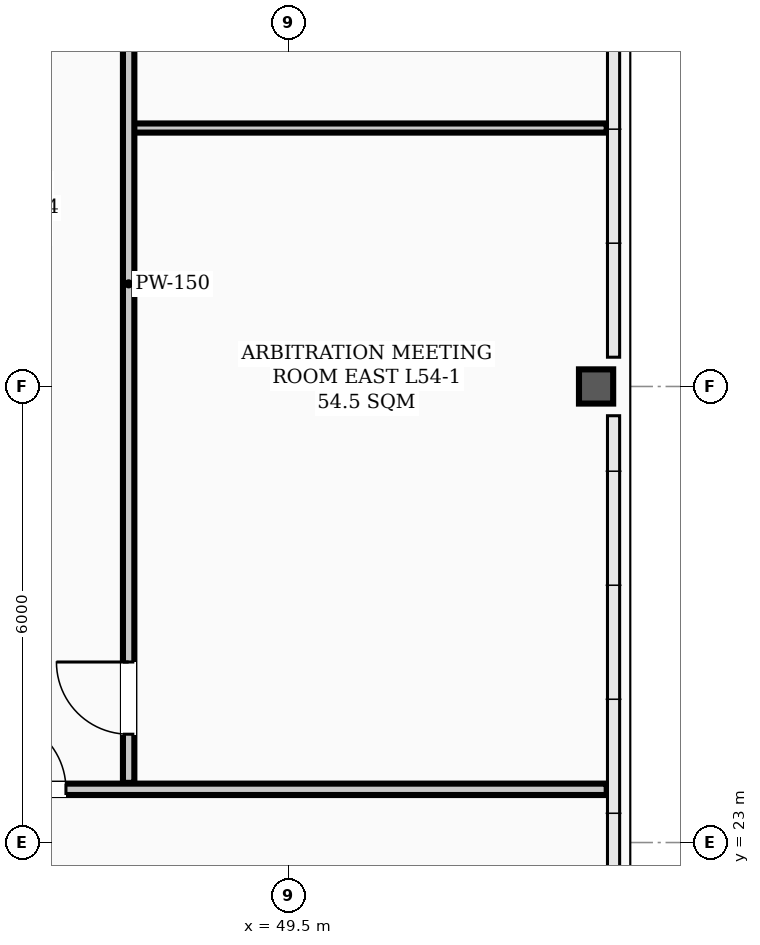
"""IFC4 building model, lengths in metres.
Left out: names, types, materials, properties, quantities, classifications, styles, units other than length and angle.
Written with IfcOpenShell. Run it as: python <this file> out.ifc"""

import sys

from ifc_helpers import new_model, si_unit, direction, frame, frame_2d, origin, origin_2d, place, context, subcontext, project, spatial, rectangle, hollow_rectangle, extrude, element, fill, save


model = new_model("IFC4")
c1 = context("Model", 3, precision=1e-05, world=origin(), true_north=direction((0.0, 1.0)))
c2 = subcontext(c1, "Body", "Model", "MODEL_VIEW")
j1 = project(units=[si_unit("LENGTHUNIT", "METRE"), si_unit("PLANEANGLEUNIT", "RADIAN")], contexts=[c1])
p1 = place(None, origin())
s1 = spatial("IfcSite", under=j1, at=p1, CompositionType="ELEMENT")
p2 = place(p1, origin())
s2 = spatial("IfcBuilding", under=s1, at=p2, CompositionType="ELEMENT")
p3 = place(p2, frame((0.0, 0.0, 218.9)))
s3 = spatial("IfcBuildingStorey", under=s2, at=p3, CompositionType="ELEMENT", Elevation=218.9)
p4 = place(p3, frame((53.55, 29.0, 0.0), z_axis=(0.0, 0.0, 1.0), x_axis=(1.0, 0.0, 0.0)))
e1 = element("IfcColumn", 1, at=p4, inside=s3, PredefinedType="COLUMN", context=c2, shape_type="SweptSolid", body=[
    extrude(hollow_rectangle(XDim=0.45, YDim=0.45, WallThickness=0.022, InnerFilletRadius=0.022, OuterFilletRadius=0.044, at=origin_2d()), origin(), (0.0, 0.0, 1.0), 3.9),
])
p5 = place(p3, frame((10.31, 23.7, 0.0), z_axis=(0.0, 0.0, 1.0), x_axis=(1.0, 0.0, 0.0)))
e2 = element("IfcWall", 2, at=p5, inside=s3, PredefinedType="PARTITIONING", context=c2, shape_type="SweptSolid", body=[
    extrude(rectangle(XDim=43.38, YDim=0.15, at=frame_2d((21.69, 0.0))), origin(), (0.0, 0.0, 1.0), 3.2),
])
p6 = place(p5, frame((0.575, 0.0, 0.0)))
e3 = element("IfcOpeningElement", 3, at=p6, cuts=e2, PredefinedType="OPENING", context=c2, shape_type="SweptSolid", body=[
    extrude(rectangle(XDim=0.95, YDim=2.08, at=frame_2d((0.475, 1.04))), frame((0.0, 0.085, 0.0), z_axis=(0.0, -1.0, 0.0), x_axis=(1.0, 0.0, 0.0)), (0.0, 0.0, 1.0), 0.17),
])
p7 = place(p5, frame((9.615, 0.0, 0.0)))
e4 = element("IfcOpeningElement", 4, at=p7, cuts=e2, PredefinedType="OPENING", context=c2, shape_type="SweptSolid", body=[
    extrude(rectangle(XDim=0.95, YDim=2.08, at=frame_2d((0.475, 1.04))), frame((0.0, 0.085, 0.0), z_axis=(0.0, -1.0, 0.0), x_axis=(1.0, 0.0, 0.0)), (0.0, 0.0, 1.0), 0.17),
])
p8 = place(p5, frame((16.215, 0.0, 0.0)))
e5 = element("IfcOpeningElement", 5, at=p8, cuts=e2, PredefinedType="OPENING", context=c2, shape_type="SweptSolid", body=[
    extrude(rectangle(XDim=0.95, YDim=2.08, at=frame_2d((0.475, 1.04))), frame((0.0, 0.085, 0.0), z_axis=(0.0, -1.0, 0.0), x_axis=(1.0, 0.0, 0.0)), (0.0, 0.0, 1.0), 0.17),
])
p9 = place(p5, frame((22.815, 0.0, 0.0)))
e6 = element("IfcOpeningElement", 6, at=p9, cuts=e2, PredefinedType="OPENING", context=c2, shape_type="SweptSolid", body=[
    extrude(rectangle(XDim=0.95, YDim=2.08, at=frame_2d((0.475, 1.04))), frame((0.0, 0.085, 0.0), z_axis=(0.0, -1.0, 0.0), x_axis=(1.0, 0.0, 0.0)), (0.0, 0.0, 1.0), 0.17),
])
p10 = place(p5, frame((29.115, 0.0, 0.0)))
e7 = element("IfcOpeningElement", 7, at=p10, cuts=e2, PredefinedType="OPENING", context=c2, shape_type="SweptSolid", body=[
    extrude(rectangle(XDim=0.95, YDim=2.08, at=frame_2d((0.475, 1.04))), frame((0.0, 0.085, 0.0), z_axis=(0.0, -1.0, 0.0), x_axis=(1.0, 0.0, 0.0)), (0.0, 0.0, 1.0), 0.17),
])
p11 = place(p5, frame((35.315, 0.0, 0.0)))
e8 = element("IfcOpeningElement", 8, at=p11, cuts=e2, PredefinedType="OPENING", context=c2, shape_type="SweptSolid", body=[
    extrude(rectangle(XDim=0.95, YDim=2.08, at=frame_2d((0.475, 1.04))), frame((0.0, 0.085, 0.0), z_axis=(0.0, -1.0, 0.0), x_axis=(1.0, 0.0, 0.0)), (0.0, 0.0, 1.0), 0.17),
])
p12 = place(p3, frame((47.4, 32.4, 0.0), z_axis=(0.0, 0.0, 1.0), x_axis=(1.0, 0.0, 0.0)))
e9 = element("IfcWall", 9, at=p12, inside=s3, PredefinedType="PARTITIONING", context=c2, shape_type="SweptSolid", body=[
    extrude(rectangle(XDim=6.29, YDim=0.12, at=frame_2d((3.145, 0.0))), origin(), (0.0, 0.0, 1.0), 3.72),
])
p13 = place(p3, frame((47.4, 23.785, 0.0), z_axis=(0.0, 0.0, 1.0), x_axis=(0.0, 1.0, 0.0)))
e10 = element("IfcWall", 10, at=p13, inside=s3, PredefinedType="PARTITIONING", context=c2, shape_type="SweptSolid", body=[
    extrude(rectangle(XDim=13.13, YDim=0.15, at=frame_2d((6.565, 0.0))), origin(), (0.0, 0.0, 1.0), 3.1),
])
p14 = place(p13, frame((0.64, 0.0, 0.0)))
e11 = element("IfcOpeningElement", 11, at=p14, cuts=e10, PredefinedType="OPENING", context=c2, shape_type="SweptSolid", body=[
    extrude(rectangle(XDim=0.95, YDim=2.08, at=frame_2d((0.475, 1.04))), frame((0.0, 0.085, 0.0), z_axis=(0.0, -1.0, 0.0), x_axis=(1.0, 0.0, 0.0)), (0.0, 0.0, 1.0), 0.17),
])
p15 = place(p13, frame((10.44, 0.0, 0.0)))
e12 = element("IfcOpeningElement", 12, at=p15, cuts=e10, PredefinedType="OPENING", context=c2, shape_type="SweptSolid", body=[
    extrude(rectangle(XDim=0.95, YDim=2.08, at=frame_2d((0.475, 1.04))), frame((0.0, 0.085, 0.0), z_axis=(0.0, -1.0, 0.0), x_axis=(1.0, 0.0, 0.0)), (0.0, 0.0, 1.0), 0.17),
])
p16 = place(p11, origin())
e13 = element("IfcDoor", 13, at=p16, inside=s3, OperationType="SINGLE_SWING_LEFT", PredefinedType="DOOR", context=c2, shape_type="SweptSolid", body=[
    extrude(rectangle(XDim=0.95, YDim=2.08, at=frame_2d((0.475, 1.04))), frame((0.0, 0.025, 0.0), z_axis=(0.0, -1.0, 0.0), x_axis=(1.0, 0.0, 0.0)), (0.0, 0.0, 1.0), 0.05),
])
fill(e8, e13)
p17 = place(p14, origin())
e14 = element("IfcDoor", 14, at=p17, inside=s3, OperationType="SINGLE_SWING_RIGHT", PredefinedType="DOOR", context=c2, shape_type="SweptSolid", body=[
    extrude(rectangle(XDim=0.95, YDim=2.08, at=frame_2d((0.475, 1.04))), frame((0.0, 0.025, 0.0), z_axis=(0.0, -1.0, 0.0), x_axis=(1.0, 0.0, 0.0)), (0.0, 0.0, 1.0), 0.05),
])
fill(e11, e14)
save(model, sys.argv[1])
